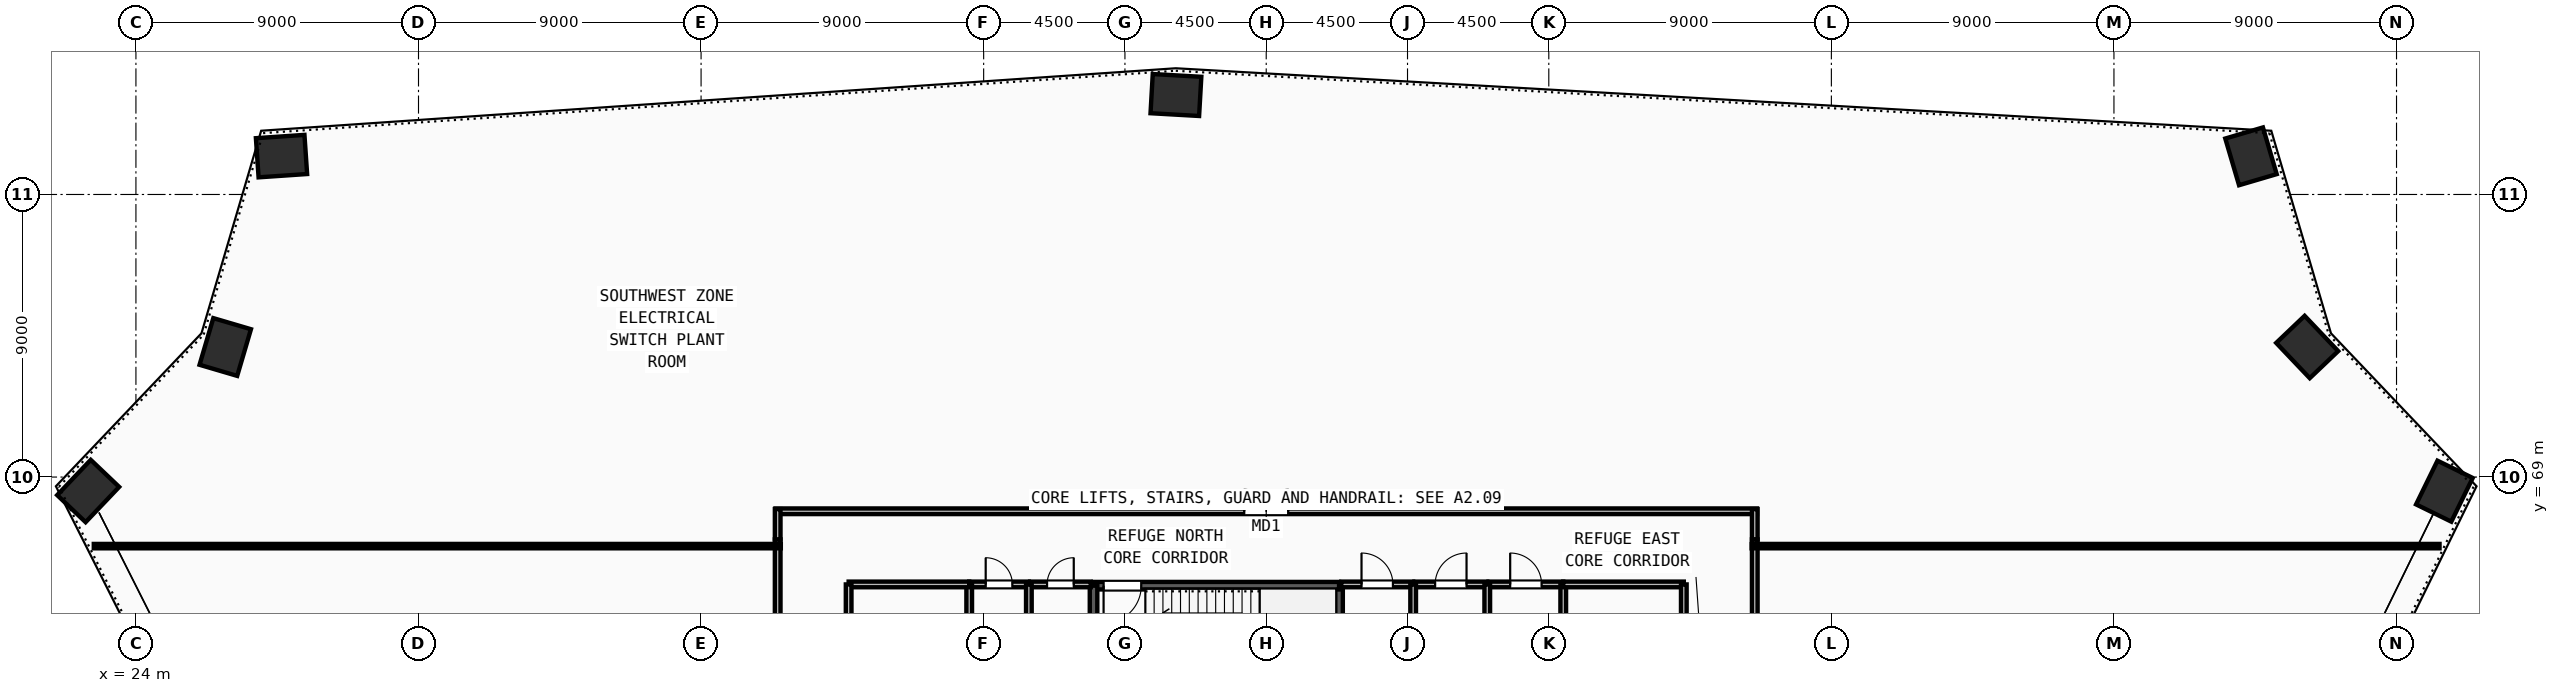
"""IFC4 building model, lengths in metres.
Left out: names, types, materials, properties, quantities, classifications, styles, units other than length and angle.
Written with IfcOpenShell. Run it as: python <this file> out.ifc"""

import sys

from ifc_helpers import new_model, si_unit, direction, frame, frame_2d, origin, origin_2d, place, context, subcontext, project, spatial, rectangle, extrude, source, transform, mapped, element, fill, save


model = new_model("IFC4")
c1 = context("Model", 3, precision=1e-05, world=origin(), true_north=direction((0.0, 1.0)))
c2 = subcontext(c1, "Body", "Model", "MODEL_VIEW")
j1 = project(units=[si_unit("LENGTHUNIT", "METRE"), si_unit("PLANEANGLEUNIT", "RADIAN")], contexts=[c1])
p1 = place(None, origin())
s1 = spatial("IfcSite", under=j1, at=p1, CompositionType="ELEMENT")
p2 = place(p1, origin())
s2 = spatial("IfcBuilding", under=s1, at=p2, CompositionType="ELEMENT")
p3 = place(p2, frame((0.0, 0.0, 93.0)))
s3 = spatial("IfcBuildingStorey", under=s2, at=p3, CompositionType="ELEMENT", Elevation=93.0)
m1 = source(origin(), c2, "Body", "SweptSolid", [
    extrude(rectangle(XDim=1.55, YDim=1.25, at=origin_2d()), origin(), (0.0, 0.0, 1.0), 4.5),
])
for number, where, z_axis, x_axis in (
    (1, (22.479, 68.555, 0.0), (0.0, 0.0, 1.0), (0.689, 0.724, 0.0)),
    (2, (26.845, 73.142, 0.0), (0.0, 0.0, 1.0), (0.283, 0.959, 0.0)),
    (3, (28.637, 79.222, 0.0), (0.0, 0.0, 1.0), (0.998, 0.068, 0.0)),
    (4, (57.124, 81.168, 0.0), (0.0, 0.0, 1.0), (-0.998, 0.057, 0.0)),
    (5, (91.365, 79.215, 0.0), (0.0, 0.0, 1.0), (-0.283, 0.959, 0.0)),
    (6, (93.155, 73.142, 0.0), (0.0, 0.0, 1.0), (-0.689, 0.724, 0.0)),
    (7, (97.525, 68.55, 0.0), (0.0, 0.0, 1.0), (0.44, 0.898, 0.0)),
):
    element("IfcColumn", number, at=place(p3, frame(where, z_axis=z_axis, x_axis=x_axis)), inside=s3, PredefinedType="COLUMN", context=c2, shape_type="MappedRepresentation", body=[
        mapped(m1, transform((0.0, 0.0, 0.0), x_axis=(1.0, 0.0, 0.0), y_axis=(0.0, 1.0, 0.0), z_axis=(0.0, 0.0, 1.0), scale=1.0)),
    ])
p4 = place(p3, frame((62.32, 62.1, 0.0), z_axis=(0.0, 0.0, 1.0), x_axis=(0.0, 1.0, 0.0)))
e8 = element("IfcWall", 8, at=p4, inside=s3, PredefinedType="SOLIDWALL", context=c2, shape_type="SweptSolid", body=[
    extrude(rectangle(XDim=3.44, YDim=0.24, at=frame_2d((1.72, 0.0))), origin(), (0.0, 0.0, 1.0), 4.22),
])
p5 = place(p3, frame((62.32, 65.54, 0.0), z_axis=(0.0, 0.0, 1.0), x_axis=(-1.0, 0.0, 0.0)))
e9 = element("IfcWall", 9, at=p5, inside=s3, PredefinedType="SOLIDWALL", context=c2, shape_type="SweptSolid", body=[
    extrude(rectangle(XDim=7.82, YDim=0.24, at=frame_2d((3.91, 0.0))), origin(), (0.0, 0.0, 1.0), 4.22),
])
m2 = source(origin(), c2, "Body", "SweptSolid", [
    extrude(rectangle(XDim=1.2, YDim=2.2, at=frame_2d((0.6, 1.1))), frame((0.0, 0.13, 0.0), z_axis=(0.0, -1.0, 0.0), x_axis=(1.0, 0.0, 0.0)), (0.0, 0.0, 1.0), 0.26),
])
p6 = place(p5, frame((6.3, 0.0, 0.0)))
e10 = element("IfcOpeningElement", 10, at=p6, cuts=e9, PredefinedType="OPENING", context=c2, shape_type="MappedRepresentation", body=[
    mapped(m2, transform((0.0, 0.0, 0.0), x_axis=(1.0, 0.0, 0.0), y_axis=(0.0, 1.0, 0.0), z_axis=(0.0, 0.0, 1.0), scale=1.0)),
])
p7 = place(p3, frame((54.5, 65.54, 0.0), z_axis=(0.0, 0.0, 1.0), x_axis=(0.0, -1.0, 0.0)))
e11 = element("IfcWall", 11, at=p7, inside=s3, PredefinedType="SOLIDWALL", context=c2, shape_type="SweptSolid", body=[
    extrude(rectangle(XDim=3.44, YDim=0.24, at=frame_2d((1.72, 0.0))), origin(), (0.0, 0.0, 1.0), 4.22),
])
p8 = place(p3, frame((50.54, 65.58, 0.0), z_axis=(0.0, 0.0, 1.0), x_axis=(1.0, 0.0, 0.0)))
e12 = element("IfcWall", 12, at=p8, inside=s3, PredefinedType="PARTITIONING", context=c2, shape_type="SweptSolid", body=[
    extrude(rectangle(XDim=1.9, YDim=0.18, at=frame_2d((0.95, 0.0))), origin(), (0.0, 0.0, 1.0), 4.22),
])
m3 = source(origin(), c2, "Body", "SweptSolid", [
    extrude(rectangle(XDim=0.85, YDim=2.1, at=frame_2d((0.425, 1.05))), frame((0.0, 0.1, 0.0), z_axis=(0.0, -1.0, 0.0), x_axis=(1.0, 0.0, 0.0)), (0.0, 0.0, 1.0), 0.2),
])
p9 = place(p8, frame((0.525, 0.0, 0.0)))
e13 = element("IfcOpeningElement", 13, at=p9, cuts=e12, PredefinedType="OPENING", context=c2, shape_type="MappedRepresentation", body=[
    mapped(m3, transform((0.0, 0.0, 0.0), x_axis=(1.0, 0.0, 0.0), y_axis=(0.0, 1.0, 0.0), z_axis=(0.0, 0.0, 1.0), scale=1.0)),
])
p10 = place(p3, frame((52.48, 65.58, 0.0), z_axis=(0.0, 0.0, 1.0), x_axis=(1.0, 0.0, 0.0)))
e14 = element("IfcWall", 14, at=p10, inside=s3, PredefinedType="PARTITIONING", context=c2, shape_type="SweptSolid", body=[
    extrude(rectangle(XDim=1.93, YDim=0.18, at=frame_2d((0.965, 0.0))), origin(), (0.0, 0.0, 1.0), 4.22),
])
p11 = place(p10, frame((0.54, 0.0, 0.0)))
e15 = element("IfcOpeningElement", 15, at=p11, cuts=e14, PredefinedType="OPENING", context=c2, shape_type="MappedRepresentation", body=[
    mapped(m3, transform((0.0, 0.0, 0.0), x_axis=(1.0, 0.0, 0.0), y_axis=(0.0, 1.0, 0.0), z_axis=(0.0, 0.0, 1.0), scale=1.0)),
])
p12 = place(p3, frame((62.39, 65.58, 0.0), z_axis=(0.0, 0.0, 1.0), x_axis=(1.0, 0.0, 0.0)))
e16 = element("IfcWall", 16, at=p12, inside=s3, PredefinedType="PARTITIONING", context=c2, shape_type="SweptSolid", body=[
    extrude(rectangle(XDim=2.29, YDim=0.18, at=frame_2d((1.145, 0.0))), origin(), (0.0, 0.0, 1.0), 4.22),
])
m4 = source(origin(), c2, "Body", "SweptSolid", [
    extrude(rectangle(XDim=1.0, YDim=2.2, at=frame_2d((0.5, 1.1))), frame((0.0, 0.1, 0.0), z_axis=(0.0, -1.0, 0.0), x_axis=(1.0, 0.0, 0.0)), (0.0, 0.0, 1.0), 0.2),
])
p13 = place(p12, frame((0.645, 0.0, 0.0)))
e17 = element("IfcOpeningElement", 17, at=p13, cuts=e16, PredefinedType="OPENING", context=c2, shape_type="MappedRepresentation", body=[
    mapped(m4, transform((0.0, 0.0, 0.0), x_axis=(1.0, 0.0, 0.0), y_axis=(0.0, 1.0, 0.0), z_axis=(0.0, 0.0, 1.0), scale=1.0)),
])
p14 = place(p3, frame((64.72, 65.58, 0.0), z_axis=(0.0, 0.0, 1.0), x_axis=(1.0, 0.0, 0.0)))
e18 = element("IfcWall", 18, at=p14, inside=s3, PredefinedType="PARTITIONING", context=c2, shape_type="SweptSolid", body=[
    extrude(rectangle(XDim=2.32, YDim=0.18, at=frame_2d((1.16, 0.0))), origin(), (0.0, 0.0, 1.0), 4.22),
])
p15 = place(p14, frame((0.66, 0.0, 0.0)))
e19 = element("IfcOpeningElement", 19, at=p15, cuts=e18, PredefinedType="OPENING", context=c2, shape_type="MappedRepresentation", body=[
    mapped(m4, transform((0.0, 0.0, 0.0), x_axis=(1.0, 0.0, 0.0), y_axis=(0.0, 1.0, 0.0), z_axis=(0.0, 0.0, 1.0), scale=1.0)),
])
p16 = place(p3, frame((67.08, 65.58, 0.0), z_axis=(0.0, 0.0, 1.0), x_axis=(1.0, 0.0, 0.0)))
e20 = element("IfcWall", 20, at=p16, inside=s3, PredefinedType="PARTITIONING", context=c2, shape_type="SweptSolid", body=[
    extrude(rectangle(XDim=2.38, YDim=0.18, at=frame_2d((1.19, 0.0))), origin(), (0.0, 0.0, 1.0), 4.22),
])
p17 = place(p16, frame((0.69, 0.0, 0.0)))
e21 = element("IfcOpeningElement", 21, at=p17, cuts=e20, PredefinedType="OPENING", context=c2, shape_type="MappedRepresentation", body=[
    mapped(m4, transform((0.0, 0.0, 0.0), x_axis=(1.0, 0.0, 0.0), y_axis=(0.0, 1.0, 0.0), z_axis=(0.0, 0.0, 1.0), scale=1.0)),
])
p18 = place(p3, frame((75.56, 67.015, 0.0), z_axis=(0.0, 0.0, 1.0), x_axis=(0.0, -1.0, 0.0)))
e22 = element("IfcWall", 22, at=p18, inside=s3, PredefinedType="PARTITIONING", context=c2, shape_type="SweptSolid", body=[
    extrude(rectangle(XDim=22.43, YDim=0.18, at=frame_2d((11.215, 0.0))), origin(), (0.0, 0.0, 1.0), 4.22),
])
m5 = source(origin(), c2, "Body", "SweptSolid", [
    extrude(rectangle(XDim=1.3, YDim=2.2, at=frame_2d((0.65, 1.1))), frame((0.0, 0.1, 0.0), z_axis=(0.0, -1.0, 0.0), x_axis=(1.0, 0.0, 0.0)), (0.0, 0.0, 1.0), 0.2),
])
p19 = place(p18, frame((10.565, 0.0, 0.0)))
e23 = element("IfcOpeningElement", 23, at=p19, cuts=e22, PredefinedType="OPENING", context=c2, shape_type="MappedRepresentation", body=[
    mapped(m5, transform((0.0, 0.0, 0.0), x_axis=(1.0, 0.0, 0.0), y_axis=(0.0, 1.0, 0.0), z_axis=(0.0, 0.0, 1.0), scale=1.0)),
])
p20 = place(p3, frame((44.37, 67.91, 0.0), z_axis=(0.0, 0.0, 1.0), x_axis=(1.0, 0.0, 0.0)))
e24 = element("IfcWall", 24, at=p20, inside=s3, PredefinedType="PARTITIONING", context=c2, shape_type="SweptSolid", body=[
    extrude(rectangle(XDim=31.26, YDim=0.18, at=frame_2d((15.63, 0.0))), origin(), (0.0, 0.0, 1.0), 4.22),
])
m6 = source(origin(), c2, "Body", "SweptSolid", [
    extrude(rectangle(XDim=1.4, YDim=2.25, at=frame_2d((0.7, 1.125))), frame((0.0, 0.1, 0.0), z_axis=(0.0, -1.0, 0.0), x_axis=(1.0, 0.0, 0.0)), (0.0, 0.0, 1.0), 0.2),
])
p21 = place(p20, frame((14.93, 0.0, 0.0)))
e25 = element("IfcOpeningElement", 25, at=p21, cuts=e24, PredefinedType="OPENING", context=c2, shape_type="MappedRepresentation", body=[
    mapped(m6, transform((0.0, 0.0, 0.0), x_axis=(1.0, 0.0, 0.0), y_axis=(0.0, 1.0, 0.0), z_axis=(0.0, 0.0, 1.0), scale=1.0)),
])
p22 = place(p3, frame((44.44, 55.98, 0.0), z_axis=(0.0, 0.0, 1.0), x_axis=(0.0, 1.0, 0.0)))
e26 = element("IfcWall", 26, at=p22, inside=s3, PredefinedType="PARTITIONING", context=c2, shape_type="SweptSolid", body=[
    extrude(rectangle(XDim=11.035, YDim=0.18, at=frame_2d((5.518, 0.0))), origin(), (0.0, 0.0, 1.0), 4.22),
])
p23 = place(p22, frame((4.518, 0.0, 0.0)))
e27 = element("IfcOpeningElement", 27, at=p23, cuts=e26, PredefinedType="OPENING", context=c2, shape_type="MappedRepresentation", body=[
    mapped(m6, transform((0.0, 0.0, 0.0), x_axis=(1.0, 0.0, 0.0), y_axis=(0.0, 1.0, 0.0), z_axis=(0.0, 0.0, 1.0), scale=1.0)),
])
for number, where, z_axis, x_axis in (
    (28, (50.54, 61.95, 0.0), (0.0, 0.0, 1.0), (0.0, 1.0, 0.0)),
    (29, (52.44, 61.95, 0.0), (0.0, 0.0, 1.0), (0.0, 1.0, 0.0)),
    (30, (64.68, 61.95, 0.0), (0.0, 0.0, 1.0), (0.0, 1.0, 0.0)),
    (31, (67.04, 61.95, 0.0), (0.0, 0.0, 1.0), (0.0, 1.0, 0.0)),
    (32, (69.46, 61.95, 0.0), (0.0, 0.0, 1.0), (0.0, 1.0, 0.0)),
):
    element("IfcWall", number, at=place(p3, frame(where, z_axis=z_axis, x_axis=x_axis)), inside=s3, PredefinedType="PARTITIONING", context=c2, shape_type="SweptSolid", body=[
        extrude(rectangle(XDim=3.63, YDim=0.18, at=frame_2d((1.815, 0.0))), origin(), (0.0, 0.0, 1.0), 4.22),
    ])
for number, where, z_axis, x_axis in (
    (33, (46.7, 65.58, 0.0), (0.0, 0.0, 1.0), (1.0, 0.0, 0.0)),
    (34, (69.46, 65.58, 0.0), (0.0, 0.0, 1.0), (1.0, 0.0, 0.0)),
):
    element("IfcWall", number, at=place(p3, frame(where, z_axis=z_axis, x_axis=x_axis)), inside=s3, PredefinedType="PARTITIONING", context=c2, shape_type="SweptSolid", body=[
        extrude(rectangle(XDim=3.84, YDim=0.18, at=frame_2d((1.92, 0.0))), origin(), (0.0, 0.0, 1.0), 4.22),
    ])
for number, where, z_axis, x_axis in (
    (35, (46.7, 60.06, 0.0), (0.0, 0.0, 1.0), (0.0, 1.0, 0.0)),
    (36, (73.3, 60.06, 0.0), (0.0, 0.0, 1.0), (0.0, 1.0, 0.0)),
):
    element("IfcWall", number, at=place(p3, frame(where, z_axis=z_axis, x_axis=x_axis)), inside=s3, PredefinedType="PARTITIONING", context=c2, shape_type="SweptSolid", body=[
        extrude(rectangle(XDim=5.52, YDim=0.18, at=frame_2d((2.76, 0.0))), origin(), (0.0, 0.0, 1.0), 4.22),
    ])
for number, where, z_axis, x_axis in (
    (37, (44.44, 67.015, 0.0), (0.0, 0.0, 1.0), (0.0, 1.0, 0.0)),
    (38, (75.56, 67.98, 0.0), (0.0, 0.0, 1.0), (0.0, -1.0, 0.0)),
):
    element("IfcWall", number, at=place(p3, frame(where, z_axis=z_axis, x_axis=x_axis)), inside=s3, PredefinedType="PARTITIONING", context=c2, shape_type="SweptSolid", body=[
        extrude(rectangle(XDim=0.965, YDim=0.18, at=frame_2d((0.482, 0.0))), origin(), (0.0, 0.0, 1.0), 4.22),
    ])
p24 = place(p3, frame((44.54, 66.8, 0.0), z_axis=(0.0, 0.0, 1.0), x_axis=(-1.0, 0.0, 0.0)))
e39 = element("IfcWall", 39, at=p24, inside=s3, PredefinedType="PARTITIONING", context=c2, shape_type="SweptSolid", body=[
    extrude(rectangle(XDim=21.882, YDim=0.14, at=frame_2d((10.941, 0.0))), origin(), (0.0, 0.0, 1.0), 3.305),
])
p25 = place(p3, frame((75.46, 66.8, 0.0), z_axis=(0.0, 0.0, 1.0), x_axis=(1.0, 0.0, 0.0)))
e40 = element("IfcWall", 40, at=p25, inside=s3, PredefinedType="PARTITIONING", context=c2, shape_type="SweptSolid", body=[
    extrude(rectangle(XDim=21.91, YDim=0.14, at=frame_2d((10.955, 0.0))), origin(), (0.0, 0.0, 1.0), 3.305),
])
m7 = source(origin(), c2, "Body", "SweptSolid", [
    extrude(rectangle(XDim=1.2, YDim=2.2, at=frame_2d((0.6, 1.1))), frame((0.0, 0.025, 0.0), z_axis=(0.0, -1.0, 0.0), x_axis=(1.0, 0.0, 0.0)), (0.0, 0.0, 1.0), 0.05),
])
p26 = place(p6, origin())
e41 = element("IfcDoor", 41, at=p26, inside=s3, OperationType="SINGLE_SWING_RIGHT", PredefinedType="DOOR", context=c2, shape_type="MappedRepresentation", body=[
    mapped(m7, transform((0.0, 0.0, 0.0), x_axis=(1.0, 0.0, 0.0), y_axis=(0.0, 1.0, 0.0), z_axis=(0.0, 0.0, 1.0), scale=1.0)),
])
fill(e10, e41)
m8 = source(origin(), c2, "Body", "SweptSolid", [
    extrude(rectangle(XDim=0.85, YDim=2.1, at=frame_2d((0.425, 1.05))), frame((0.0, 0.025, 0.0), z_axis=(0.0, -1.0, 0.0), x_axis=(1.0, 0.0, 0.0)), (0.0, 0.0, 1.0), 0.05),
])
p27 = place(p9, origin())
e42 = element("IfcDoor", 42, at=p27, inside=s3, OperationType="SINGLE_SWING_LEFT", PredefinedType="DOOR", context=c2, shape_type="MappedRepresentation", body=[
    mapped(m8, transform((0.0, 0.0, 0.0), x_axis=(1.0, 0.0, 0.0), y_axis=(0.0, 1.0, 0.0), z_axis=(0.0, 0.0, 1.0), scale=1.0)),
])
fill(e13, e42)
p28 = place(p11, origin())
e43 = element("IfcDoor", 43, at=p28, inside=s3, OperationType="SINGLE_SWING_RIGHT", PredefinedType="DOOR", context=c2, shape_type="MappedRepresentation", body=[
    mapped(m8, transform((0.0, 0.0, 0.0), x_axis=(1.0, 0.0, 0.0), y_axis=(0.0, 1.0, 0.0), z_axis=(0.0, 0.0, 1.0), scale=1.0)),
])
fill(e15, e43)
m9 = source(origin(), c2, "Body", "SweptSolid", [
    extrude(rectangle(XDim=1.0, YDim=2.2, at=frame_2d((0.5, 1.1))), frame((0.0, 0.025, 0.0), z_axis=(0.0, -1.0, 0.0), x_axis=(1.0, 0.0, 0.0)), (0.0, 0.0, 1.0), 0.05),
])
p29 = place(p13, origin())
e44 = element("IfcDoor", 44, at=p29, inside=s3, OperationType="SINGLE_SWING_LEFT", PredefinedType="DOOR", context=c2, shape_type="MappedRepresentation", body=[
    mapped(m9, transform((0.0, 0.0, 0.0), x_axis=(1.0, 0.0, 0.0), y_axis=(0.0, 1.0, 0.0), z_axis=(0.0, 0.0, 1.0), scale=1.0)),
])
fill(e17, e44)
p30 = place(p15, origin())
e45 = element("IfcDoor", 45, at=p30, inside=s3, OperationType="SINGLE_SWING_RIGHT", PredefinedType="DOOR", context=c2, shape_type="MappedRepresentation", body=[
    mapped(m9, transform((0.0, 0.0, 0.0), x_axis=(1.0, 0.0, 0.0), y_axis=(0.0, 1.0, 0.0), z_axis=(0.0, 0.0, 1.0), scale=1.0)),
])
fill(e19, e45)
p31 = place(p17, origin())
e46 = element("IfcDoor", 46, at=p31, inside=s3, OperationType="SINGLE_SWING_LEFT", PredefinedType="DOOR", context=c2, shape_type="MappedRepresentation", body=[
    mapped(m9, transform((0.0, 0.0, 0.0), x_axis=(1.0, 0.0, 0.0), y_axis=(0.0, 1.0, 0.0), z_axis=(0.0, 0.0, 1.0), scale=1.0)),
])
fill(e21, e46)
m10 = source(origin(), c2, "Body", "SweptSolid", [
    extrude(rectangle(XDim=1.4, YDim=2.25, at=frame_2d((0.7, 1.125))), frame((0.0, 0.025, 0.0), z_axis=(0.0, -1.0, 0.0), x_axis=(1.0, 0.0, 0.0)), (0.0, 0.0, 1.0), 0.05),
])
p32 = place(p21, origin())
e47 = element("IfcDoor", 47, at=p32, inside=s3, OperationType="DOUBLE_DOOR_SINGLE_SWING", PredefinedType="DOOR", context=c2, shape_type="MappedRepresentation", body=[
    mapped(m10, transform((0.0, 0.0, 0.0), x_axis=(1.0, 0.0, 0.0), y_axis=(0.0, 1.0, 0.0), z_axis=(0.0, 0.0, 1.0), scale=1.0)),
])
fill(e25, e47)
save(model, sys.argv[1])
